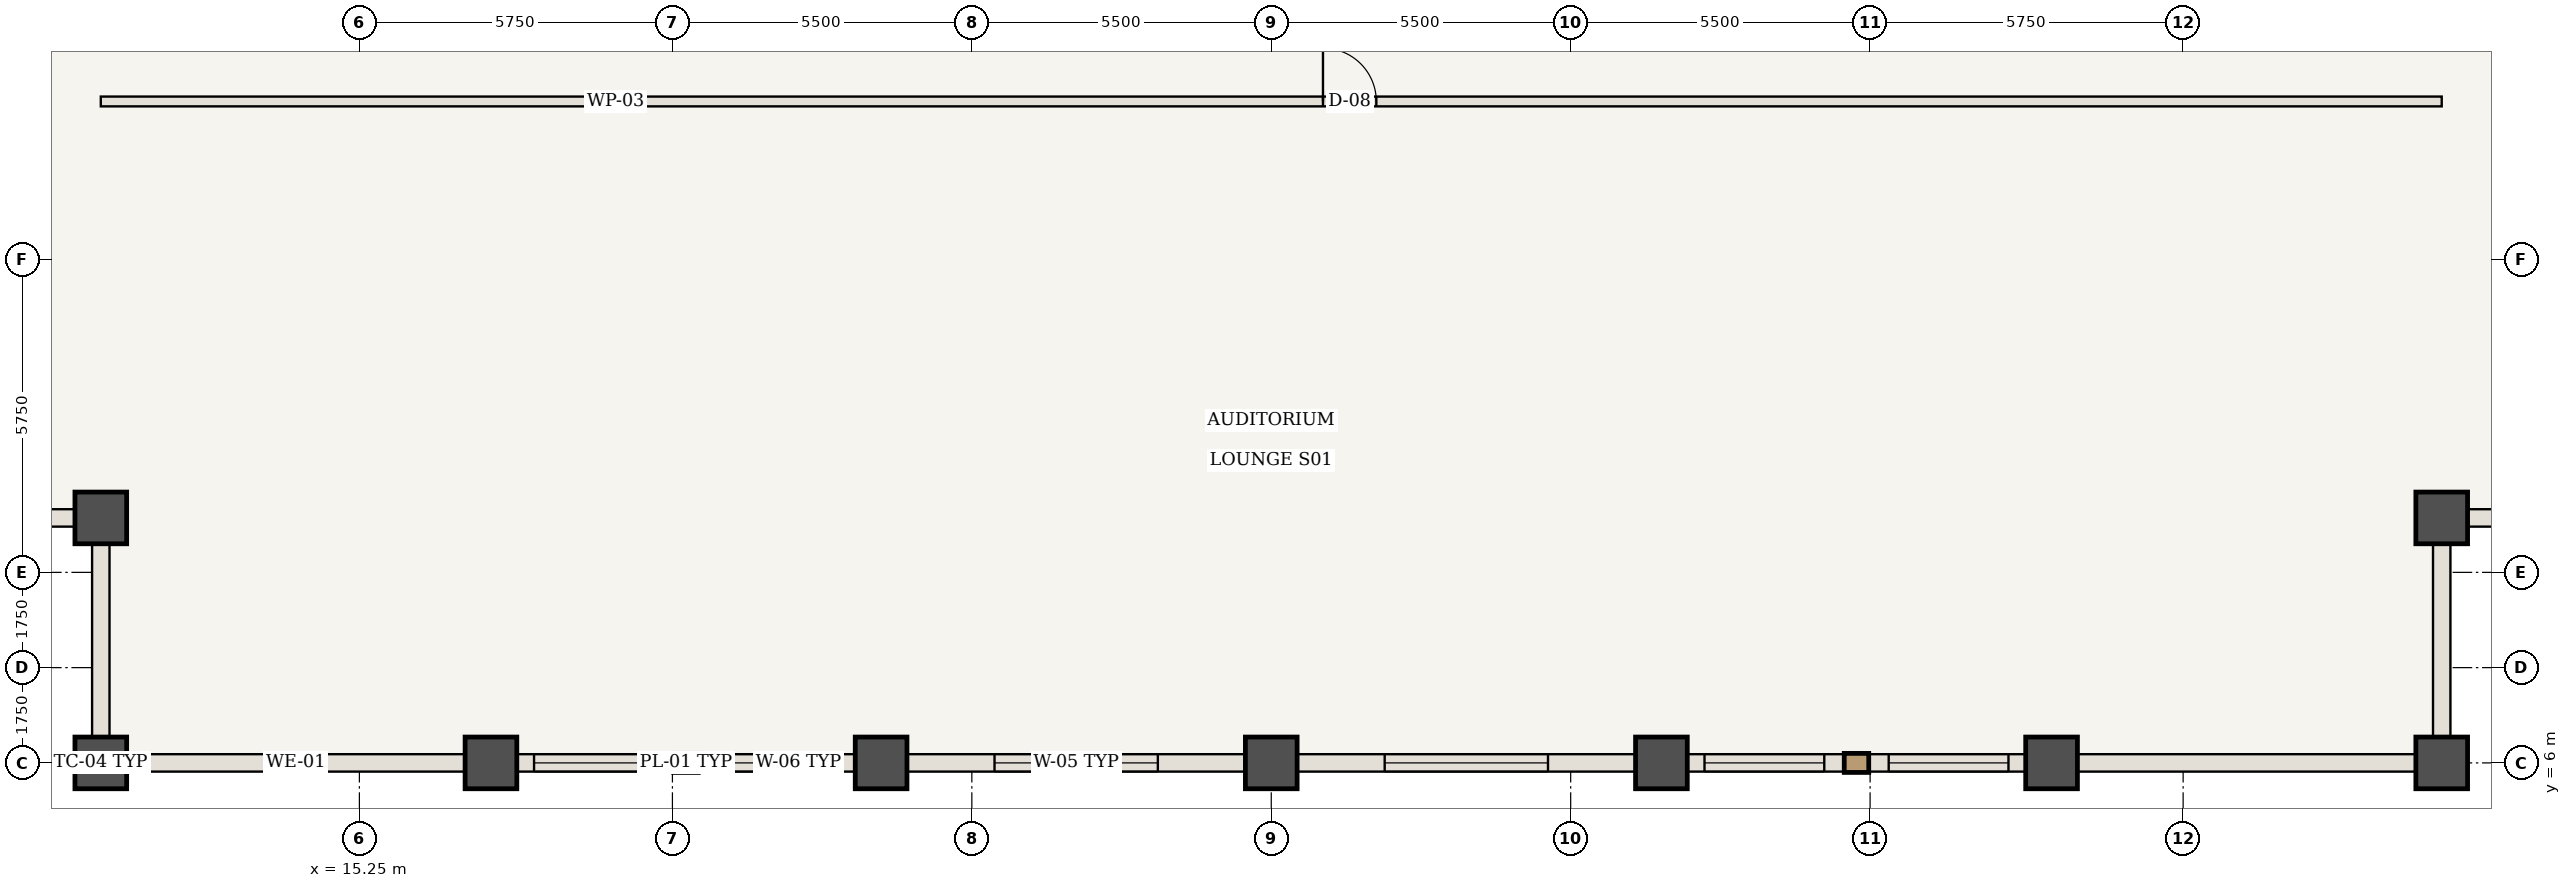
"""IFC4 building model, lengths in metres.
Left out: names, types, materials, properties, quantities, classifications, styles, units other than length and angle.
Written with IfcOpenShell. Run it as: python <this file> out.ifc"""

import sys

from ifc_helpers import new_model, si_unit, direction, frame, frame_2d, origin, origin_2d, place, context, subcontext, project, spatial, rectangle, extrude, element, fill, save


model = new_model("IFC4")
c1 = context("Model", 3, precision=1e-05, world=origin(), true_north=direction((0.0, 1.0)))
c2 = subcontext(c1, "Body", "Model", "MODEL_VIEW")
j1 = project(units=[si_unit("LENGTHUNIT", "METRE"), si_unit("PLANEANGLEUNIT", "RADIAN")], contexts=[c1])
p1 = place(None, origin())
s1 = spatial("IfcSite", under=j1, at=p1, CompositionType="ELEMENT")
p2 = place(p1, origin())
s2 = spatial("IfcBuilding", under=s1, at=p2, CompositionType="ELEMENT")
p3 = place(p2, frame((0.0, 0.0, 172.2)))
s3 = spatial("IfcBuildingStorey", under=s2, at=p3, CompositionType="ELEMENT", Elevation=172.2)
for number, where, z_axis, x_axis in (
    (1, (10.5, 6.0, 0.0), (0.0, 0.0, 1.0), (1.0, 0.0, 0.0)),
    (2, (10.5, 10.5, 0.0), (0.0, 0.0, 1.0), (1.0, 0.0, 0.0)),
    (3, (53.5, 6.0, 0.0), (0.0, 0.0, 1.0), (1.0, 0.0, 0.0)),
    (4, (53.5, 10.5, 0.0), (0.0, 0.0, 1.0), (1.0, 0.0, 0.0)),
    (5, (17.667, 6.0, 0.0), (0.0, 0.0, 1.0), (1.0, 0.0, 0.0)),
    (6, (24.833, 6.0, 0.0), (0.0, 0.0, 1.0), (1.0, 0.0, 0.0)),
    (7, (32.0, 6.0, 0.0), (0.0, 0.0, 1.0), (1.0, 0.0, 0.0)),
    (8, (39.167, 6.0, 0.0), (0.0, 0.0, 1.0), (1.0, 0.0, 0.0)),
    (9, (46.333, 6.0, 0.0), (0.0, 0.0, 1.0), (1.0, 0.0, 0.0)),
):
    element("IfcColumn", number, at=place(p3, frame(where, z_axis=z_axis, x_axis=x_axis)), inside=s3, PredefinedType="COLUMN", context=c2, shape_type="SweptSolid", body=[
        extrude(rectangle(XDim=0.95, YDim=0.95, at=origin_2d()), origin(), (0.0, 0.0, 1.0), 3.85),
    ])
p4 = place(p3, frame((10.5, 18.15, 0.0), z_axis=(0.0, 0.0, 1.0), x_axis=(1.0, 0.0, 0.0)))
e10 = element("IfcWall", 10, at=p4, inside=s3, PredefinedType="STANDARD", context=c2, shape_type="SweptSolid", body=[
    extrude(rectangle(XDim=43.0, YDim=0.18, at=frame_2d((21.5, 0.0))), origin(), (0.0, 0.0, 1.0), 3.43),
])
p5 = place(p4, frame((22.45, 0.0, 0.0)))
e11 = element("IfcOpeningElement", 11, at=p5, cuts=e10, PredefinedType="OPENING", context=c2, shape_type="SweptSolid", body=[
    extrude(rectangle(XDim=0.98, YDim=2.2, at=frame_2d((0.49, 1.1))), frame((0.0, 0.1, 0.0), z_axis=(0.0, -1.0, 0.0), x_axis=(1.0, 0.0, 0.0)), (0.0, 0.0, 1.0), 0.2),
])
p6 = place(p3, frame((17.667, 6.0, 0.0), z_axis=(0.0, 0.0, 1.0), x_axis=(-1.0, 0.0, 0.0)))
e12 = element("IfcWall", 12, at=p6, inside=s3, PredefinedType="USERDEFINED", context=c2, shape_type="SweptSolid", body=[
    extrude(rectangle(XDim=7.167, YDim=0.32, at=frame_2d((3.583, 0.0))), origin(), (0.0, 0.0, 1.0), 2.63),
])
p7 = place(p3, frame((24.833, 6.0, 0.0), z_axis=(0.0, 0.0, 1.0), x_axis=(-1.0, 0.0, 0.0)))
e13 = element("IfcWall", 13, at=p7, inside=s3, PredefinedType="USERDEFINED", context=c2, shape_type="SweptSolid", body=[
    extrude(rectangle(XDim=7.167, YDim=0.32, at=frame_2d((3.583, 0.0))), origin(), (0.0, 0.0, 1.0), 2.63),
])
p8 = place(p7, frame((0.792, 0.0, 0.85)))
e14 = element("IfcOpeningElement", 14, at=p8, cuts=e13, PredefinedType="OPENING", context=c2, shape_type="SweptSolid", body=[
    extrude(rectangle(XDim=2.2, YDim=1.58, at=frame_2d((1.1, 0.79))), frame((0.0, 0.17, 0.0), z_axis=(0.0, -1.0, 0.0), x_axis=(1.0, 0.0, 0.0)), (0.0, 0.0, 1.0), 0.34),
])
p9 = place(p7, frame((4.175, 0.0, 0.85)))
e15 = element("IfcOpeningElement", 15, at=p9, cuts=e13, PredefinedType="OPENING", context=c2, shape_type="SweptSolid", body=[
    extrude(rectangle(XDim=2.2, YDim=1.58, at=frame_2d((1.1, 0.79))), frame((0.0, 0.17, 0.0), z_axis=(0.0, -1.0, 0.0), x_axis=(1.0, 0.0, 0.0)), (0.0, 0.0, 1.0), 0.34),
])
p10 = place(p3, frame((32.0, 6.0, 0.0), z_axis=(0.0, 0.0, 1.0), x_axis=(-1.0, 0.0, 0.0)))
e16 = element("IfcWall", 16, at=p10, inside=s3, PredefinedType="USERDEFINED", context=c2, shape_type="SweptSolid", body=[
    extrude(rectangle(XDim=7.167, YDim=0.32, at=frame_2d((3.583, 0.0))), origin(), (0.0, 0.0, 1.0), 2.63),
])
p11 = place(p10, frame((2.083, 0.0, 0.85)))
e17 = element("IfcOpeningElement", 17, at=p11, cuts=e16, PredefinedType="OPENING", context=c2, shape_type="SweptSolid", body=[
    extrude(rectangle(XDim=3.0, YDim=1.58, at=frame_2d((1.5, 0.79))), frame((0.0, 0.17, 0.0), z_axis=(0.0, -1.0, 0.0), x_axis=(1.0, 0.0, 0.0)), (0.0, 0.0, 1.0), 0.34),
])
p12 = place(p3, frame((39.167, 6.0, 0.0), z_axis=(0.0, 0.0, 1.0), x_axis=(-1.0, 0.0, 0.0)))
e18 = element("IfcWall", 18, at=p12, inside=s3, PredefinedType="USERDEFINED", context=c2, shape_type="SweptSolid", body=[
    extrude(rectangle(XDim=7.167, YDim=0.32, at=frame_2d((3.583, 0.0))), origin(), (0.0, 0.0, 1.0), 2.63),
])
p13 = place(p12, frame((2.083, 0.0, 0.85)))
e19 = element("IfcOpeningElement", 19, at=p13, cuts=e18, PredefinedType="OPENING", context=c2, shape_type="SweptSolid", body=[
    extrude(rectangle(XDim=3.0, YDim=1.58, at=frame_2d((1.5, 0.79))), frame((0.0, 0.17, 0.0), z_axis=(0.0, -1.0, 0.0), x_axis=(1.0, 0.0, 0.0)), (0.0, 0.0, 1.0), 0.34),
])
p14 = place(p3, frame((46.333, 6.0, 0.0), z_axis=(0.0, 0.0, 1.0), x_axis=(-1.0, 0.0, 0.0)))
e20 = element("IfcWall", 20, at=p14, inside=s3, PredefinedType="USERDEFINED", context=c2, shape_type="SweptSolid", body=[
    extrude(rectangle(XDim=7.167, YDim=0.32, at=frame_2d((3.583, 0.0))), origin(), (0.0, 0.0, 1.0), 2.63),
])
p15 = place(p14, frame((0.792, 0.0, 0.85)))
e21 = element("IfcOpeningElement", 21, at=p15, cuts=e20, PredefinedType="OPENING", context=c2, shape_type="SweptSolid", body=[
    extrude(rectangle(XDim=2.2, YDim=1.58, at=frame_2d((1.1, 0.79))), frame((0.0, 0.17, 0.0), z_axis=(0.0, -1.0, 0.0), x_axis=(1.0, 0.0, 0.0)), (0.0, 0.0, 1.0), 0.34),
])
p16 = place(p14, frame((4.175, 0.0, 0.85)))
e22 = element("IfcOpeningElement", 22, at=p16, cuts=e20, PredefinedType="OPENING", context=c2, shape_type="SweptSolid", body=[
    extrude(rectangle(XDim=2.2, YDim=1.58, at=frame_2d((1.1, 0.79))), frame((0.0, 0.17, 0.0), z_axis=(0.0, -1.0, 0.0), x_axis=(1.0, 0.0, 0.0)), (0.0, 0.0, 1.0), 0.34),
])
p17 = place(p3, frame((53.5, 6.0, 0.0), z_axis=(0.0, 0.0, 1.0), x_axis=(-1.0, 0.0, 0.0)))
e23 = element("IfcWall", 23, at=p17, inside=s3, PredefinedType="USERDEFINED", context=c2, shape_type="SweptSolid", body=[
    extrude(rectangle(XDim=7.167, YDim=0.32, at=frame_2d((3.583, 0.0))), origin(), (0.0, 0.0, 1.0), 2.63),
])
for number, where, z_axis, x_axis in (
    (24, (10.5, 6.0, 0.0), (0.0, 0.0, 1.0), (0.0, 1.0, 0.0)),
    (25, (10.5, 10.5, 0.0), (0.0, 0.0, 1.0), (-1.0, 0.0, 0.0)),
    (26, (53.5, 10.5, 0.0), (0.0, 0.0, 1.0), (0.0, -1.0, 0.0)),
    (27, (58.0, 10.5, 0.0), (0.0, 0.0, 1.0), (-1.0, 0.0, 0.0)),
):
    element("IfcWall", number, at=place(p3, frame(where, z_axis=z_axis, x_axis=x_axis)), inside=s3, PredefinedType="USERDEFINED", context=c2, shape_type="SweptSolid", body=[
        extrude(rectangle(XDim=4.5, YDim=0.32, at=frame_2d((2.25, 0.0))), origin(), (0.0, 0.0, 1.0), 2.63),
    ])
p18 = place(p5, origin())
e28 = element("IfcDoor", 28, at=p18, inside=s3, OperationType="SINGLE_SWING_LEFT", PredefinedType="DOOR", context=c2, shape_type="SweptSolid", body=[
    extrude(rectangle(XDim=0.98, YDim=2.2, at=frame_2d((0.49, 1.1))), frame((0.0, 0.025, 0.0), z_axis=(0.0, -1.0, 0.0), x_axis=(1.0, 0.0, 0.0)), (0.0, 0.0, 1.0), 0.05),
])
fill(e11, e28)
p19 = place(p8, origin())
e29 = element("IfcWindow", 29, at=p19, inside=s3, PartitioningType="SINGLE_PANEL", PredefinedType="WINDOW", context=c2, shape_type="SweptSolid", body=[
    extrude(rectangle(XDim=2.2, YDim=1.58, at=frame_2d((1.1, 0.79))), frame((0.0, 0.03, 0.0), z_axis=(0.0, -1.0, 0.0), x_axis=(1.0, 0.0, 0.0)), (0.0, 0.0, 1.0), 0.06),
])
fill(e14, e29)
p20 = place(p9, origin())
e30 = element("IfcWindow", 30, at=p20, inside=s3, PartitioningType="SINGLE_PANEL", PredefinedType="WINDOW", context=c2, shape_type="SweptSolid", body=[
    extrude(rectangle(XDim=2.2, YDim=1.58, at=frame_2d((1.1, 0.79))), frame((0.0, 0.03, 0.0), z_axis=(0.0, -1.0, 0.0), x_axis=(1.0, 0.0, 0.0)), (0.0, 0.0, 1.0), 0.06),
])
fill(e15, e30)
p21 = place(p11, origin())
e31 = element("IfcWindow", 31, at=p21, inside=s3, PartitioningType="SINGLE_PANEL", PredefinedType="WINDOW", context=c2, shape_type="SweptSolid", body=[
    extrude(rectangle(XDim=3.0, YDim=1.58, at=frame_2d((1.5, 0.79))), frame((0.0, 0.03, 0.0), z_axis=(0.0, -1.0, 0.0), x_axis=(1.0, 0.0, 0.0)), (0.0, 0.0, 1.0), 0.06),
])
fill(e17, e31)
p22 = place(p13, origin())
e32 = element("IfcWindow", 32, at=p22, inside=s3, PartitioningType="SINGLE_PANEL", PredefinedType="WINDOW", context=c2, shape_type="SweptSolid", body=[
    extrude(rectangle(XDim=3.0, YDim=1.58, at=frame_2d((1.5, 0.79))), frame((0.0, 0.03, 0.0), z_axis=(0.0, -1.0, 0.0), x_axis=(1.0, 0.0, 0.0)), (0.0, 0.0, 1.0), 0.06),
])
fill(e19, e32)
p23 = place(p15, origin())
e33 = element("IfcWindow", 33, at=p23, inside=s3, PartitioningType="SINGLE_PANEL", PredefinedType="WINDOW", context=c2, shape_type="SweptSolid", body=[
    extrude(rectangle(XDim=2.2, YDim=1.58, at=frame_2d((1.1, 0.79))), frame((0.0, 0.03, 0.0), z_axis=(0.0, -1.0, 0.0), x_axis=(1.0, 0.0, 0.0)), (0.0, 0.0, 1.0), 0.06),
])
fill(e21, e33)
p24 = place(p16, origin())
e34 = element("IfcWindow", 34, at=p24, inside=s3, PartitioningType="SINGLE_PANEL", PredefinedType="WINDOW", context=c2, shape_type="SweptSolid", body=[
    extrude(rectangle(XDim=2.2, YDim=1.58, at=frame_2d((1.1, 0.79))), frame((0.0, 0.03, 0.0), z_axis=(0.0, -1.0, 0.0), x_axis=(1.0, 0.0, 0.0)), (0.0, 0.0, 1.0), 0.06),
])
fill(e22, e34)
save(model, sys.argv[1])
